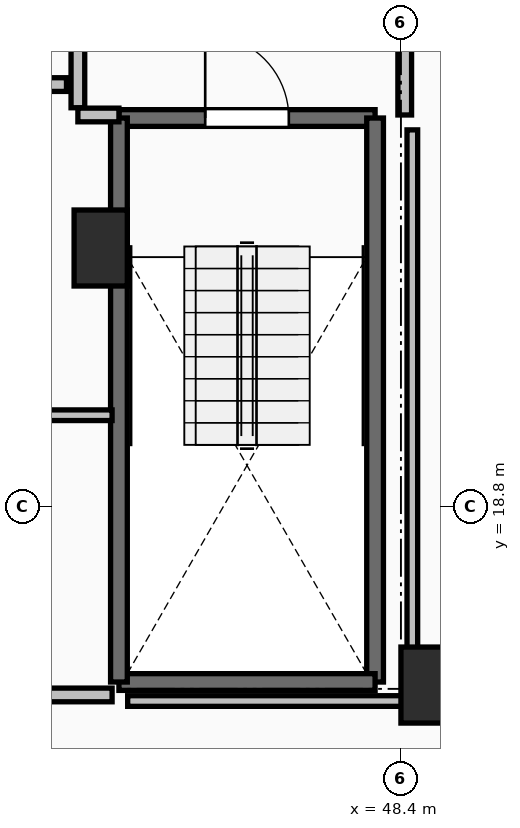
"""IFC4 building model, lengths in metres.
Left out: names, types, materials, properties, quantities, classifications, styles, units other than length and angle.
Written with IfcOpenShell. Run it as: python <this file> out.ifc"""

import sys

from ifc_helpers import new_model, si_unit, direction, frame, frame_2d, origin, origin_2d, place, context, subcontext, project, spatial, rectangle, extrude, element, fill, save


model = new_model("IFC4")
c1 = context("Model", 3, precision=1e-05, world=origin(), true_north=direction((0.0, 1.0)))
c2 = subcontext(c1, "Body", "Model", "MODEL_VIEW")
j1 = project(units=[si_unit("LENGTHUNIT", "METRE"), si_unit("PLANEANGLEUNIT", "RADIAN")], contexts=[c1])
p1 = place(None, origin())
s1 = spatial("IfcSite", under=j1, at=p1, CompositionType="ELEMENT")
p2 = place(p1, origin())
s2 = spatial("IfcBuilding", under=s1, at=p2, CompositionType="ELEMENT")
p3 = place(p2, frame((0.0, 0.0, 186.1)))
s3 = spatial("IfcBuildingStorey", under=s2, at=p3, CompositionType="ELEMENT", Elevation=186.1)
for number, where, z_axis, x_axis in (
    (1, (48.75, 16.45, 0.0), (0.0, 0.0, 1.0), (1.0, 0.0, 0.0)),
    (2, (44.45, 22.2, 0.0), (0.0, 0.0, 1.0), (1.0, 0.0, 0.0)),
):
    element("IfcColumn", number, at=place(p3, frame(where, z_axis=z_axis, x_axis=x_axis)), inside=s3, PredefinedType="PILASTER", context=c2, shape_type="SweptSolid", body=[
        extrude(rectangle(XDim=0.7, YDim=1.0, at=origin_2d()), origin(), (0.0, 0.0, 1.0), 3.5),
    ])
p4 = place(p3, frame((44.69, 23.91, 0.0), z_axis=(0.0, 0.0, 1.0), x_axis=(1.0, 0.0, 0.0)))
e3 = element("IfcWall", 3, at=p4, inside=s3, PredefinedType="SOLIDWALL", context=c2, shape_type="SweptSolid", body=[
    extrude(rectangle(XDim=3.37, YDim=0.22, at=frame_2d((1.685, 0.0))), origin(), (0.0, 0.0, 1.0), 3.24),
])
p5 = place(p4, frame((1.135, 0.0, 0.0)))
e4 = element("IfcOpeningElement", 4, at=p5, cuts=e3, PredefinedType="OPENING", context=c2, shape_type="SweptSolid", body=[
    extrude(rectangle(XDim=1.1, YDim=2.15, at=frame_2d((0.55, 1.075))), frame((0.0, 0.125, 0.0), z_axis=(0.0, -1.0, 0.0), x_axis=(1.0, 0.0, 0.0)), (0.0, 0.0, 1.0), 0.25),
])
p6 = place(p3, frame((48.06, 23.91, 0.0), z_axis=(0.0, 0.0, 1.0), x_axis=(0.0, -1.0, 0.0)))
e5 = element("IfcWall", 5, at=p6, inside=s3, PredefinedType="SOLIDWALL", context=c2, shape_type="SweptSolid", body=[
    extrude(rectangle(XDim=7.42, YDim=0.22, at=frame_2d((3.71, 0.0))), origin(), (0.0, 0.0, 1.0), 3.24),
])
p7 = place(p3, frame((48.06, 16.49, 0.0), z_axis=(0.0, 0.0, 1.0), x_axis=(-1.0, 0.0, 0.0)))
e6 = element("IfcWall", 6, at=p7, inside=s3, PredefinedType="SOLIDWALL", context=c2, shape_type="SweptSolid", body=[
    extrude(rectangle(XDim=3.37, YDim=0.22, at=frame_2d((1.685, 0.0))), origin(), (0.0, 0.0, 1.0), 3.24),
])
p8 = place(p3, frame((44.69, 16.49, 0.0), z_axis=(0.0, 0.0, 1.0), x_axis=(0.0, 1.0, 0.0)))
e7 = element("IfcWall", 7, at=p8, inside=s3, PredefinedType="SOLIDWALL", context=c2, shape_type="SweptSolid", body=[
    extrude(rectangle(XDim=7.42, YDim=0.22, at=frame_2d((3.71, 0.0))), origin(), (0.0, 0.0, 1.0), 3.24),
])
p9 = place(p3, frame((44.15, 27.955, 0.0), z_axis=(0.0, 0.0, 1.0), x_axis=(0.0, -1.0, 0.0)))
e8 = element("IfcWall", 8, at=p9, inside=s3, PredefinedType="PARTITIONING", context=c2, shape_type="SweptSolid", body=[
    extrude(rectangle(XDim=3.91, YDim=0.18, at=frame_2d((1.955, 0.0))), origin(), (0.0, 0.0, 1.0), 3.24),
])
p10 = place(p9, frame((1.355, 0.0, 0.0)))
e9 = element("IfcOpeningElement", 9, at=p10, cuts=e8, PredefinedType="OPENING", context=c2, shape_type="SweptSolid", body=[
    extrude(rectangle(XDim=1.2, YDim=2.15, at=frame_2d((0.6, 1.075))), frame((0.0, 0.105, 0.0), z_axis=(0.0, -1.0, 0.0), x_axis=(1.0, 0.0, 0.0)), (0.0, 0.0, 1.0), 0.21),
])
p11 = place(p3, frame((44.15, 23.95, 0.0), z_axis=(0.0, 0.0, 1.0), x_axis=(1.0, 0.0, 0.0)))
e10 = element("IfcWall", 10, at=p11, inside=s3, PredefinedType="PARTITIONING", context=c2, shape_type="SweptSolid", body=[
    extrude(rectangle(XDim=0.54, YDim=0.18, at=frame_2d((0.27, 0.0))), origin(), (0.0, 0.0, 1.0), 3.24),
])
p12 = place(p3, frame((48.45, 23.95, 0.0), z_axis=(0.0, 0.0, 1.0), x_axis=(0.0, 1.0, 0.0)))
e11 = element("IfcWall", 11, at=p12, inside=s3, PredefinedType="PARTITIONING", context=c2, shape_type="SweptSolid", body=[
    extrude(rectangle(XDim=4.05, YDim=0.18, at=frame_2d((2.025, 0.0))), origin(), (0.0, 0.0, 1.0), 3.24),
])
p13 = place(p12, frame((1.425, 0.0, 0.0)))
e12 = element("IfcOpeningElement", 12, at=p13, cuts=e11, PredefinedType="OPENING", context=c2, shape_type="SweptSolid", body=[
    extrude(rectangle(XDim=1.2, YDim=2.15, at=frame_2d((0.6, 1.075))), frame((0.0, 0.105, 0.0), z_axis=(0.0, -1.0, 0.0), x_axis=(1.0, 0.0, 0.0)), (0.0, 0.0, 1.0), 0.21),
])
p14 = place(p3, frame((41.555, 24.35, 0.0), z_axis=(0.0, 0.0, 1.0), x_axis=(1.0, 0.0, 0.0)))
e13 = element("IfcWall", 13, at=p14, inside=s3, PredefinedType="PARTITIONING", context=c2, shape_type="SweptSolid", body=[
    extrude(rectangle(XDim=2.445, YDim=0.18, at=frame_2d((1.223, 0.0))), origin(), (0.0, 0.0, 1.0), 3.24),
])
p15 = place(p14, frame((0.722, 0.0, 0.0)))
e14 = element("IfcOpeningElement", 14, at=p15, cuts=e13, PredefinedType="OPENING", context=c2, shape_type="SweptSolid", body=[
    extrude(rectangle(XDim=1.0, YDim=2.15, at=frame_2d((0.5, 1.075))), frame((0.0, 0.105, 0.0), z_axis=(0.0, -1.0, 0.0), x_axis=(1.0, 0.0, 0.0)), (0.0, 0.0, 1.0), 0.21),
])
p16 = place(p3, frame((44.6, 20.0, 0.0), z_axis=(0.0, 0.0, 1.0), x_axis=(-1.0, 0.0, 0.0)))
e15 = element("IfcWall", 15, at=p16, inside=s3, PredefinedType="PARTITIONING", context=c2, shape_type="SweptSolid", body=[
    extrude(rectangle(XDim=3.2, YDim=0.14, at=frame_2d((1.6, 0.0))), origin(), (0.0, 0.0, 1.0), 3.24),
])
p17 = place(p3, frame((41.4, 16.32, 0.0), z_axis=(0.0, 0.0, 1.0), x_axis=(1.0, 0.0, 0.0)))
e16 = element("IfcWall", 16, at=p17, inside=s3, PredefinedType="PARTITIONING", context=c2, shape_type="SweptSolid", body=[
    extrude(rectangle(XDim=3.2, YDim=0.18, at=frame_2d((1.6, 0.0))), origin(), (0.0, 0.0, 1.0), 3.24),
])
p18 = place(p17, frame((1.2, 0.0, 0.0)))
e17 = element("IfcOpeningElement", 17, at=p18, cuts=e16, PredefinedType="OPENING", context=c2, shape_type="SweptSolid", body=[
    extrude(rectangle(XDim=0.8, YDim=2.05, at=frame_2d((0.4, 1.025))), frame((0.0, 0.105, 0.0), z_axis=(0.0, -1.0, 0.0), x_axis=(1.0, 0.0, 0.0)), (0.0, 0.0, 1.0), 0.21),
])
p19 = place(p3, frame((44.805, 16.24, 0.0), z_axis=(0.0, 0.0, 1.0), x_axis=(1.0, 0.0, 0.0)))
e18 = element("IfcWall", 18, at=p19, inside=s3, PredefinedType="PARTITIONING", context=c2, shape_type="SweptSolid", body=[
    extrude(rectangle(XDim=3.745, YDim=0.14, at=frame_2d((1.873, 0.0))), origin(), (0.0, 0.0, 1.0), 2.432),
])
p20 = place(p3, frame((48.55, 16.24, 0.0), z_axis=(0.0, 0.0, 1.0), x_axis=(0.0, 1.0, 0.0)))
e19 = element("IfcWall", 19, at=p20, inside=s3, PredefinedType="PARTITIONING", context=c2, shape_type="SweptSolid", body=[
    extrude(rectangle(XDim=7.514, YDim=0.14, at=frame_2d((3.757, 0.0))), origin(), (0.0, 0.0, 1.0), 2.432),
])
p21 = place(p5, origin())
e20 = element("IfcDoor", 20, at=p21, inside=s3, OperationType="SINGLE_SWING_LEFT", PredefinedType="DOOR", context=c2, shape_type="SweptSolid", body=[
    extrude(rectangle(XDim=1.1, YDim=2.15, at=frame_2d((0.55, 1.075))), frame((0.0, 0.025, 0.0), z_axis=(0.0, -1.0, 0.0), x_axis=(1.0, 0.0, 0.0)), (0.0, 0.0, 1.0), 0.05),
])
fill(e4, e20)
save(model, sys.argv[1])
